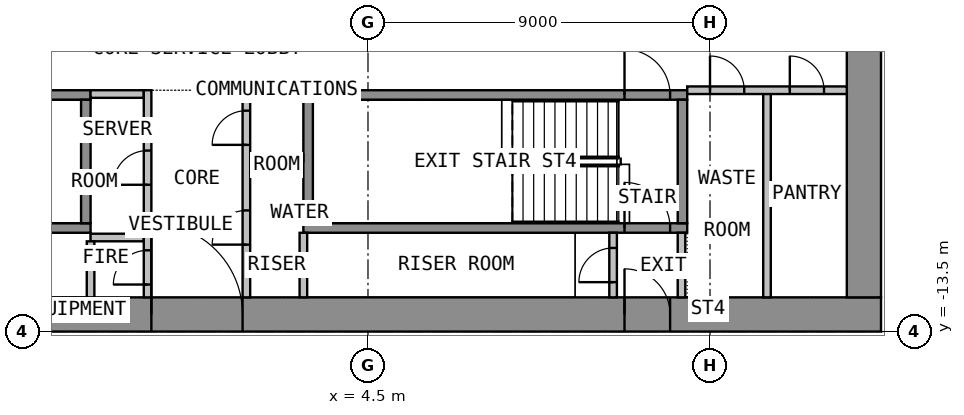
"""IFC4 building model, lengths in metres.
Left out: names, types, materials, properties, quantities, classifications, styles, units other than length and angle.
Written with IfcOpenShell. Run it as: python <this file> out.ifc"""

import sys

from ifc_helpers import new_model, si_unit, direction, frame, frame_2d, origin, place, context, subcontext, project, spatial, rectangle, extrude, element, fill, save


model = new_model("IFC4")
c1 = context("Model", 3, precision=1e-05, world=origin(), true_north=direction((0.0, 1.0)))
c2 = subcontext(c1, "Body", "Model", "MODEL_VIEW")
j1 = project(units=[si_unit("LENGTHUNIT", "METRE"), si_unit("PLANEANGLEUNIT", "RADIAN")], contexts=[c1])
p1 = place(None, origin())
s1 = spatial("IfcSite", under=j1, at=p1, CompositionType="ELEMENT")
p2 = place(p1, origin())
s2 = spatial("IfcBuilding", under=s1, at=p2, CompositionType="ELEMENT")
p3 = place(p2, frame((0.0, 0.0, 81.3)))
s3 = spatial("IfcBuildingStorey", under=s2, at=p3, CompositionType="ELEMENT", Elevation=81.3)
p4 = place(p3, frame((-18.0, -13.05, 0.0), z_axis=(0.0, 0.0, 1.0), x_axis=(1.0, 0.0, 0.0)))
e1 = element("IfcWall", 1, at=p4, inside=s3, PredefinedType="SHEAR", context=c2, shape_type="SweptSolid", body=[
    extrude(rectangle(XDim=36.0, YDim=0.9, at=frame_2d((18.0, 0.0))), origin(), (0.0, 0.0, 1.0), 3.525),
])
p5 = place(p4, frame((16.8, 0.0, 0.0)))
e2 = element("IfcOpeningElement", 2, at=p5, cuts=e1, PredefinedType="OPENING", context=c2, shape_type="SweptSolid", body=[
    extrude(rectangle(XDim=2.4, YDim=2.1, at=frame_2d((1.2, 1.05))), frame((0.0, 0.46, 0.0), z_axis=(0.0, -1.0, 0.0), x_axis=(1.0, 0.0, 0.0)), (0.0, 0.0, 1.0), 0.92),
])
p6 = place(p4, frame((5.55, 0.0, 0.0)))
e3 = element("IfcOpeningElement", 3, at=p6, cuts=e1, PredefinedType="OPENING", context=c2, shape_type="SweptSolid", body=[
    extrude(rectangle(XDim=1.2, YDim=2.1, at=frame_2d((0.6, 1.05))), frame((0.0, 0.46, 0.0), z_axis=(0.0, -1.0, 0.0), x_axis=(1.0, 0.0, 0.0)), (0.0, 0.0, 1.0), 0.92),
])
p7 = place(p4, frame((29.25, 0.0, 0.0)))
e4 = element("IfcOpeningElement", 4, at=p7, cuts=e1, PredefinedType="OPENING", context=c2, shape_type="SweptSolid", body=[
    extrude(rectangle(XDim=1.2, YDim=2.1, at=frame_2d((0.6, 1.05))), frame((0.0, 0.46, 0.0), z_axis=(0.0, -1.0, 0.0), x_axis=(1.0, 0.0, 0.0)), (0.0, 0.0, 1.0), 0.92),
])
p8 = place(p3, frame((17.55, -12.6, 0.0), z_axis=(0.0, 0.0, 1.0), x_axis=(0.0, 1.0, 0.0)))
e5 = element("IfcWall", 5, at=p8, inside=s3, PredefinedType="SHEAR", context=c2, shape_type="SweptSolid", body=[
    extrude(rectangle(XDim=25.2, YDim=0.9, at=frame_2d((12.6, 0.0))), origin(), (0.0, 0.0, 1.0), 3.525),
])
p9 = place(p8, frame((11.4, 0.0, 0.0)))
e6 = element("IfcOpeningElement", 6, at=p9, cuts=e5, PredefinedType="OPENING", context=c2, shape_type="SweptSolid", body=[
    extrude(rectangle(XDim=2.4, YDim=2.1, at=frame_2d((1.2, 1.05))), frame((0.0, 0.46, 0.0), z_axis=(0.0, -1.0, 0.0), x_axis=(1.0, 0.0, 0.0)), (0.0, 0.0, 1.0), 0.92),
])
p10 = place(p3, frame((-12.9, -10.775, 0.0), z_axis=(0.0, 0.0, 1.0), x_axis=(1.0, 0.0, 0.0)))
e7 = element("IfcWall", 7, at=p10, inside=s3, PredefinedType="SHEAR", context=c2, shape_type="SweptSolid", body=[
    extrude(rectangle(XDim=10.1, YDim=0.25, at=frame_2d((5.05, 0.0))), origin(), (0.0, 0.0, 1.0), 3.525),
])
p11 = place(p10, frame((0.45, 0.0, 0.0)))
e8 = element("IfcOpeningElement", 8, at=p11, cuts=e7, PredefinedType="OPENING", context=c2, shape_type="SweptSolid", body=[
    extrude(rectangle(XDim=1.2, YDim=2.1, at=frame_2d((0.6, 1.05))), frame((0.0, 0.135, 0.0), z_axis=(0.0, -1.0, 0.0), x_axis=(1.0, 0.0, 0.0)), (0.0, 0.0, 1.0), 0.27),
])
p12 = place(p3, frame((-12.9, -7.275, 0.0), z_axis=(0.0, 0.0, 1.0), x_axis=(1.0, 0.0, 0.0)))
e9 = element("IfcWall", 9, at=p12, inside=s3, PredefinedType="SHEAR", context=c2, shape_type="SweptSolid", body=[
    extrude(rectangle(XDim=10.1, YDim=0.25, at=frame_2d((5.05, 0.0))), origin(), (0.0, 0.0, 1.0), 3.525),
])
p13 = place(p12, frame((0.45, 0.0, 0.0)))
e10 = element("IfcOpeningElement", 10, at=p13, cuts=e9, PredefinedType="OPENING", context=c2, shape_type="SweptSolid", body=[
    extrude(rectangle(XDim=1.2, YDim=2.1, at=frame_2d((0.6, 1.05))), frame((0.0, 0.135, 0.0), z_axis=(0.0, -1.0, 0.0), x_axis=(1.0, 0.0, 0.0)), (0.0, 0.0, 1.0), 0.27),
])
p14 = place(p3, frame((-2.925, -10.65, 0.0), z_axis=(0.0, 0.0, 1.0), x_axis=(0.0, 1.0, 0.0)))
e11 = element("IfcWall", 11, at=p14, inside=s3, PredefinedType="SHEAR", context=c2, shape_type="SweptSolid", body=[
    extrude(rectangle(XDim=3.25, YDim=0.25, at=frame_2d((1.625, 0.0))), origin(), (0.0, 0.0, 1.0), 3.525),
])
p15 = place(p3, frame((2.8, -10.775, 0.0), z_axis=(0.0, 0.0, 1.0), x_axis=(1.0, 0.0, 0.0)))
e12 = element("IfcWall", 12, at=p15, inside=s3, PredefinedType="SHEAR", context=c2, shape_type="SweptSolid", body=[
    extrude(rectangle(XDim=10.1, YDim=0.25, at=frame_2d((5.05, 0.0))), origin(), (0.0, 0.0, 1.0), 3.525),
])
p16 = place(p15, frame((8.45, 0.0, 0.0)))
e13 = element("IfcOpeningElement", 13, at=p16, cuts=e12, PredefinedType="OPENING", context=c2, shape_type="SweptSolid", body=[
    extrude(rectangle(XDim=1.2, YDim=2.1, at=frame_2d((0.6, 1.05))), frame((0.0, 0.135, 0.0), z_axis=(0.0, -1.0, 0.0), x_axis=(1.0, 0.0, 0.0)), (0.0, 0.0, 1.0), 0.27),
])
p17 = place(p3, frame((2.8, -7.275, 0.0), z_axis=(0.0, 0.0, 1.0), x_axis=(1.0, 0.0, 0.0)))
e14 = element("IfcWall", 14, at=p17, inside=s3, PredefinedType="SHEAR", context=c2, shape_type="SweptSolid", body=[
    extrude(rectangle(XDim=10.1, YDim=0.25, at=frame_2d((5.05, 0.0))), origin(), (0.0, 0.0, 1.0), 3.525),
])
p18 = place(p17, frame((8.45, 0.0, 0.0)))
e15 = element("IfcOpeningElement", 15, at=p18, cuts=e14, PredefinedType="OPENING", context=c2, shape_type="SweptSolid", body=[
    extrude(rectangle(XDim=1.2, YDim=2.1, at=frame_2d((0.6, 1.05))), frame((0.0, 0.135, 0.0), z_axis=(0.0, -1.0, 0.0), x_axis=(1.0, 0.0, 0.0)), (0.0, 0.0, 1.0), 0.27),
])
for number, where, z_axis, x_axis in (
    (16, (2.925, -10.65, 0.0), (0.0, 0.0, 1.0), (0.0, 1.0, 0.0)),
    (17, (12.775, -10.65, 0.0), (0.0, 0.0, 1.0), (0.0, 1.0, 0.0)),
):
    element("IfcWall", number, at=place(p3, frame(where, z_axis=z_axis, x_axis=x_axis)), inside=s3, PredefinedType="SHEAR", context=c2, shape_type="SweptSolid", body=[
        extrude(rectangle(XDim=3.25, YDim=0.25, at=frame_2d((1.625, 0.0))), origin(), (0.0, 0.0, 1.0), 3.525),
    ])
for number, where, z_axis, x_axis in (
    (18, (-2.8, -7.25, 0.0), (0.0, 0.0, 1.0), (1.0, 0.0, 0.0)),
    (19, (-2.8, -11.025, 0.0), (0.0, 0.0, 1.0), (1.0, 0.0, 0.0)),
    (20, (1.4, -7.25, 0.0), (0.0, 0.0, 1.0), (1.0, 0.0, 0.0)),
    (21, (1.4, -8.925, 0.0), (0.0, 0.0, 1.0), (1.0, 0.0, 0.0)),
):
    element("IfcWall", number, at=place(p3, frame(where, z_axis=z_axis, x_axis=x_axis)), inside=s3, PredefinedType="PARTITIONING", context=c2, shape_type="SweptSolid", body=[
        extrude(rectangle(XDim=1.4, YDim=0.2, at=frame_2d((0.7, 0.0))), origin(), (0.0, 0.0, 1.0), 3.525),
    ])
p19 = place(p3, frame((-1.3, -12.6, 0.0), z_axis=(0.0, 0.0, 1.0), x_axis=(0.0, 1.0, 0.0)))
e22 = element("IfcWall", 22, at=p19, inside=s3, PredefinedType="PARTITIONING", context=c2, shape_type="SweptSolid", body=[
    extrude(rectangle(XDim=5.45, YDim=0.2, at=frame_2d((2.725, 0.0))), origin(), (0.0, 0.0, 1.0), 3.525),
])
p20 = place(p19, frame((0.337, 0.0, 0.0)))
e23 = element("IfcOpeningElement", 23, at=p20, cuts=e22, PredefinedType="OPENING", context=c2, shape_type="SweptSolid", body=[
    extrude(rectangle(XDim=0.9, YDim=2.1, at=frame_2d((0.45, 1.05))), frame((0.0, 0.11, 0.0), z_axis=(0.0, -1.0, 0.0), x_axis=(1.0, 0.0, 0.0)), (0.0, 0.0, 1.0), 0.22),
])
p21 = place(p19, frame((2.962, 0.0, 0.0)))
e24 = element("IfcOpeningElement", 24, at=p21, cuts=e22, PredefinedType="OPENING", context=c2, shape_type="SweptSolid", body=[
    extrude(rectangle(XDim=0.9, YDim=2.1, at=frame_2d((0.45, 1.05))), frame((0.0, 0.11, 0.0), z_axis=(0.0, -1.0, 0.0), x_axis=(1.0, 0.0, 0.0)), (0.0, 0.0, 1.0), 0.22),
])
p22 = place(p3, frame((1.3, -12.6, 0.0), z_axis=(0.0, 0.0, 1.0), x_axis=(0.0, 1.0, 0.0)))
e25 = element("IfcWall", 25, at=p22, inside=s3, PredefinedType="PARTITIONING", context=c2, shape_type="SweptSolid", body=[
    extrude(rectangle(XDim=5.45, YDim=0.2, at=frame_2d((2.725, 0.0))), origin(), (0.0, 0.0, 1.0), 3.525),
])
p23 = place(p22, frame((1.387, 0.0, 0.0)))
e26 = element("IfcOpeningElement", 26, at=p23, cuts=e25, PredefinedType="OPENING", context=c2, shape_type="SweptSolid", body=[
    extrude(rectangle(XDim=0.9, YDim=2.1, at=frame_2d((0.45, 1.05))), frame((0.0, 0.11, 0.0), z_axis=(0.0, -1.0, 0.0), x_axis=(1.0, 0.0, 0.0)), (0.0, 0.0, 1.0), 0.22),
])
p24 = place(p22, frame((4.012, 0.0, 0.0)))
e27 = element("IfcOpeningElement", 27, at=p24, cuts=e25, PredefinedType="OPENING", context=c2, shape_type="SweptSolid", body=[
    extrude(rectangle(XDim=0.9, YDim=2.1, at=frame_2d((0.45, 1.05))), frame((0.0, 0.11, 0.0), z_axis=(0.0, -1.0, 0.0), x_axis=(1.0, 0.0, 0.0)), (0.0, 0.0, 1.0), 0.22),
])
p25 = place(p3, frame((12.75, -12.6, 0.0), z_axis=(0.0, 0.0, 1.0), x_axis=(0.0, 1.0, 0.0)))
e28 = element("IfcWall", 28, at=p25, inside=s3, PredefinedType="PARTITIONING", context=c2, shape_type="SweptSolid", body=[
    extrude(rectangle(XDim=1.7, YDim=0.2, at=frame_2d((0.85, 0.0))), origin(), (0.0, 0.0, 1.0), 3.525),
])
p26 = place(p3, frame((10.95, -12.6, 0.0), z_axis=(0.0, 0.0, 1.0), x_axis=(0.0, 1.0, 0.0)))
e29 = element("IfcWall", 29, at=p26, inside=s3, PredefinedType="PARTITIONING", context=c2, shape_type="SweptSolid", body=[
    extrude(rectangle(XDim=1.7, YDim=0.2, at=frame_2d((0.85, 0.0))), origin(), (0.0, 0.0, 1.0), 3.525),
])
p27 = place(p26, frame((0.4, 0.0, 0.0)))
e30 = element("IfcOpeningElement", 30, at=p27, cuts=e29, PredefinedType="OPENING", context=c2, shape_type="SweptSolid", body=[
    extrude(rectangle(XDim=0.9, YDim=2.1, at=frame_2d((0.45, 1.05))), frame((0.0, 0.11, 0.0), z_axis=(0.0, -1.0, 0.0), x_axis=(1.0, 0.0, 0.0)), (0.0, 0.0, 1.0), 0.22),
])
p28 = place(p3, frame((15.0, -12.6, 0.0), z_axis=(0.0, 0.0, 1.0), x_axis=(0.0, 1.0, 0.0)))
e31 = element("IfcWall", 31, at=p28, inside=s3, PredefinedType="PARTITIONING", context=c2, shape_type="SweptSolid", body=[
    extrude(rectangle(XDim=5.45, YDim=0.2, at=frame_2d((2.725, 0.0))), origin(), (0.0, 0.0, 1.0), 3.525),
])
p29 = place(p3, frame((12.9, -7.15, 0.0), z_axis=(0.0, 0.0, 1.0), x_axis=(1.0, 0.0, 0.0)))
e32 = element("IfcWall", 32, at=p29, inside=s3, PredefinedType="PARTITIONING", context=c2, shape_type="SweptSolid", body=[
    extrude(rectangle(XDim=4.2, YDim=0.2, at=frame_2d((2.1, 0.0))), origin(), (0.0, 0.0, 1.0), 3.525),
])
p30 = place(p29, frame((0.6, 0.0, 0.0)))
e33 = element("IfcOpeningElement", 33, at=p30, cuts=e32, PredefinedType="OPENING", context=c2, shape_type="SweptSolid", body=[
    extrude(rectangle(XDim=0.9, YDim=2.1, at=frame_2d((0.45, 1.05))), frame((0.0, 0.11, 0.0), z_axis=(0.0, -1.0, 0.0), x_axis=(1.0, 0.0, 0.0)), (0.0, 0.0, 1.0), 0.22),
])
p31 = place(p29, frame((2.7, 0.0, 0.0)))
e34 = element("IfcOpeningElement", 34, at=p31, cuts=e32, PredefinedType="OPENING", context=c2, shape_type="SweptSolid", body=[
    extrude(rectangle(XDim=0.9, YDim=2.1, at=frame_2d((0.45, 1.05))), frame((0.0, 0.11, 0.0), z_axis=(0.0, -1.0, 0.0), x_axis=(1.0, 0.0, 0.0)), (0.0, 0.0, 1.0), 0.22),
])
p32 = place(p3, frame((-2.8, -12.599, 0.0), z_axis=(0.0, 0.0, 1.0), x_axis=(0.0, 1.0, 0.0)))
e35 = element("IfcWall", 35, at=p32, inside=s3, PredefinedType="PARTITIONING", context=c2, shape_type="SweptSolid", body=[
    extrude(rectangle(XDim=1.473, YDim=0.2, at=frame_2d((0.737, 0.0))), origin(), (0.0, 0.0, 1.0), 3.525),
])
p33 = place(p3, frame((2.8, -12.599, 0.0), z_axis=(0.0, 0.0, 1.0), x_axis=(0.0, 1.0, 0.0)))
e36 = element("IfcWall", 36, at=p33, inside=s3, PredefinedType="PARTITIONING", context=c2, shape_type="SweptSolid", body=[
    extrude(rectangle(XDim=1.698, YDim=0.2, at=frame_2d((0.849, 0.0))), origin(), (0.0, 0.0, 1.0), 3.525),
])
p34 = place(p5, origin())
e37 = element("IfcDoor", 37, at=p34, inside=s3, OperationType="DOUBLE_DOOR_DOUBLE_SWING", PredefinedType="DOOR", context=c2, shape_type="SweptSolid", body=[
    extrude(rectangle(XDim=2.4, YDim=2.1, at=frame_2d((1.2, 1.05))), frame((0.0, 0.025, 0.0), z_axis=(0.0, -1.0, 0.0), x_axis=(1.0, 0.0, 0.0)), (0.0, 0.0, 1.0), 0.05),
])
fill(e2, e37)
p35 = place(p7, origin())
e38 = element("IfcDoor", 38, at=p35, inside=s3, OperationType="SINGLE_SWING_RIGHT", PredefinedType="DOOR", context=c2, shape_type="SweptSolid", body=[
    extrude(rectangle(XDim=1.2, YDim=2.1, at=frame_2d((0.6, 1.05))), frame((0.0, 0.025, 0.0), z_axis=(0.0, -1.0, 0.0), x_axis=(1.0, 0.0, 0.0)), (0.0, 0.0, 1.0), 0.05),
])
fill(e4, e38)
p36 = place(p18, origin())
e39 = element("IfcDoor", 39, at=p36, inside=s3, OperationType="SINGLE_SWING_LEFT", PredefinedType="DOOR", context=c2, shape_type="SweptSolid", body=[
    extrude(rectangle(XDim=1.2, YDim=2.1, at=frame_2d((0.6, 1.05))), frame((0.0, 0.025, 0.0), z_axis=(0.0, -1.0, 0.0), x_axis=(1.0, 0.0, 0.0)), (0.0, 0.0, 1.0), 0.05),
])
fill(e15, e39)
p37 = place(p20, origin())
e40 = element("IfcDoor", 40, at=p37, inside=s3, OperationType="SINGLE_SWING_LEFT", PredefinedType="DOOR", context=c2, shape_type="SweptSolid", body=[
    extrude(rectangle(XDim=0.9, YDim=2.1, at=frame_2d((0.45, 1.05))), frame((0.0, 0.025, 0.0), z_axis=(0.0, -1.0, 0.0), x_axis=(1.0, 0.0, 0.0)), (0.0, 0.0, 1.0), 0.05),
])
fill(e23, e40)
p38 = place(p21, origin())
e41 = element("IfcDoor", 41, at=p38, inside=s3, OperationType="SINGLE_SWING_LEFT", PredefinedType="DOOR", context=c2, shape_type="SweptSolid", body=[
    extrude(rectangle(XDim=0.9, YDim=2.1, at=frame_2d((0.45, 1.05))), frame((0.0, 0.025, 0.0), z_axis=(0.0, -1.0, 0.0), x_axis=(1.0, 0.0, 0.0)), (0.0, 0.0, 1.0), 0.05),
])
fill(e24, e41)
p39 = place(p23, origin())
e42 = element("IfcDoor", 42, at=p39, inside=s3, OperationType="SINGLE_SWING_LEFT", PredefinedType="DOOR", context=c2, shape_type="SweptSolid", body=[
    extrude(rectangle(XDim=0.9, YDim=2.1, at=frame_2d((0.45, 1.05))), frame((0.0, 0.025, 0.0), z_axis=(0.0, -1.0, 0.0), x_axis=(1.0, 0.0, 0.0)), (0.0, 0.0, 1.0), 0.05),
])
fill(e26, e42)
p40 = place(p24, origin())
e43 = element("IfcDoor", 43, at=p40, inside=s3, OperationType="SINGLE_SWING_LEFT", PredefinedType="DOOR", context=c2, shape_type="SweptSolid", body=[
    extrude(rectangle(XDim=0.9, YDim=2.1, at=frame_2d((0.45, 1.05))), frame((0.0, 0.025, 0.0), z_axis=(0.0, -1.0, 0.0), x_axis=(1.0, 0.0, 0.0)), (0.0, 0.0, 1.0), 0.05),
])
fill(e27, e43)
p41 = place(p16, origin())
e44 = element("IfcDoor", 44, at=p41, inside=s3, OperationType="SINGLE_SWING_RIGHT", PredefinedType="DOOR", context=c2, shape_type="SweptSolid", body=[
    extrude(rectangle(XDim=1.2, YDim=2.1, at=frame_2d((0.6, 1.05))), frame((0.0, 0.025, 0.0), z_axis=(0.0, -1.0, 0.0), x_axis=(1.0, 0.0, 0.0)), (0.0, 0.0, 1.0), 0.05),
])
fill(e13, e44)
p42 = place(p27, origin())
e45 = element("IfcDoor", 45, at=p42, inside=s3, OperationType="SINGLE_SWING_LEFT", PredefinedType="DOOR", context=c2, shape_type="SweptSolid", body=[
    extrude(rectangle(XDim=0.9, YDim=2.1, at=frame_2d((0.45, 1.05))), frame((0.0, 0.025, 0.0), z_axis=(0.0, -1.0, 0.0), x_axis=(1.0, 0.0, 0.0)), (0.0, 0.0, 1.0), 0.05),
])
fill(e30, e45)
p43 = place(p30, origin())
e46 = element("IfcDoor", 46, at=p43, inside=s3, OperationType="SINGLE_SWING_LEFT", PredefinedType="DOOR", context=c2, shape_type="SweptSolid", body=[
    extrude(rectangle(XDim=0.9, YDim=2.1, at=frame_2d((0.45, 1.05))), frame((0.0, 0.025, 0.0), z_axis=(0.0, -1.0, 0.0), x_axis=(1.0, 0.0, 0.0)), (0.0, 0.0, 1.0), 0.05),
])
fill(e33, e46)
p44 = place(p31, origin())
e47 = element("IfcDoor", 47, at=p44, inside=s3, OperationType="SINGLE_SWING_LEFT", PredefinedType="DOOR", context=c2, shape_type="SweptSolid", body=[
    extrude(rectangle(XDim=0.9, YDim=2.1, at=frame_2d((0.45, 1.05))), frame((0.0, 0.025, 0.0), z_axis=(0.0, -1.0, 0.0), x_axis=(1.0, 0.0, 0.0)), (0.0, 0.0, 1.0), 0.05),
])
fill(e34, e47)
save(model, sys.argv[1])
